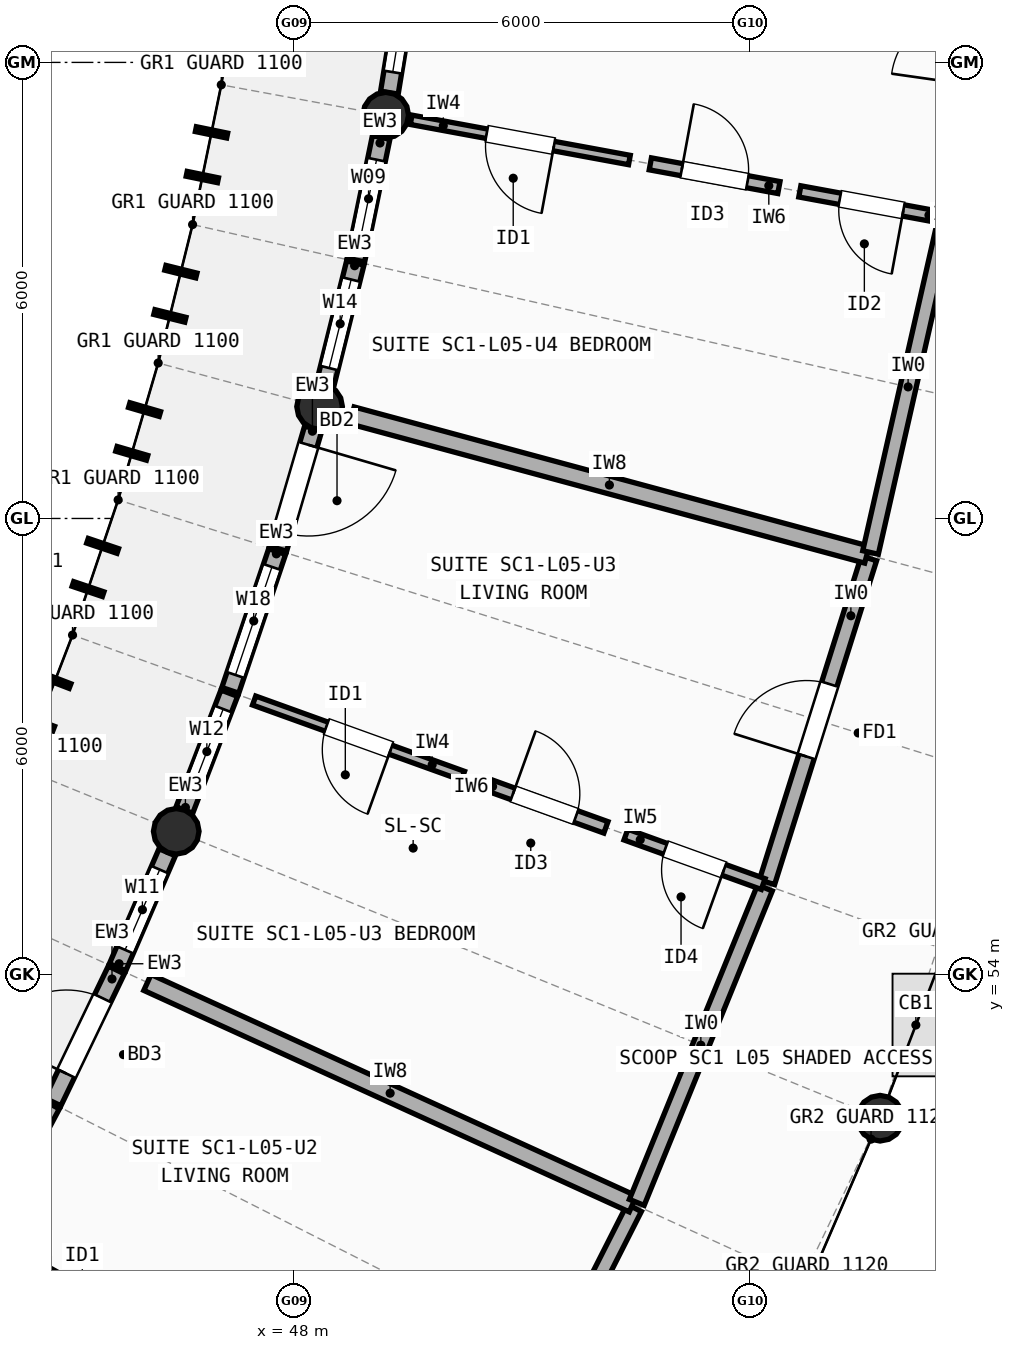
"""IFC4 building model, lengths in metres.
Left out: names, types, materials, properties, quantities, classifications, styles, units other than length and angle.
Written with IfcOpenShell. Run it as: python <this file> out.ifc"""

import sys

from ifc_helpers import new_model, si_unit, direction, frame, frame_2d, origin, origin_2d, place, context, subcontext, project, spatial, rectangle, circle, extrude, element, fill, save


model = new_model("IFC4")
c1 = context("Model", 3, precision=1e-05, world=origin(), true_north=direction((0.0, 1.0)))
c2 = subcontext(c1, "Body", "Model", "MODEL_VIEW")
j1 = project(units=[si_unit("LENGTHUNIT", "METRE"), si_unit("PLANEANGLEUNIT", "RADIAN")], contexts=[c1])
p1 = place(None, origin())
s1 = spatial("IfcSite", under=j1, at=p1, CompositionType="ELEMENT")
p2 = place(p1, origin())
s2 = spatial("IfcBuilding", under=s1, at=p2, CompositionType="ELEMENT")
p3 = place(p2, frame((0.0, 0.0, 17.3)))
s3 = spatial("IfcBuildingStorey", under=s2, at=p3, CompositionType="ELEMENT", Elevation=17.3)
for number, where, z_axis, x_axis in (
    (1, (46.45, 55.884, 0.0), (0.0, 0.0, 1.0), (1.0, 0.0, 0.0)),
    (2, (55.71, 52.11, 0.0), (0.0, 0.0, 1.0), (1.0, 0.0, 0.0)),
    (3, (48.336, 61.471, 0.0), (0.0, 0.0, 1.0), (1.0, 0.0, 0.0)),
    (4, (49.206, 65.306, 0.0), (0.0, 0.0, 1.0), (1.0, 0.0, 0.0)),
):
    element("IfcColumn", number, at=place(p3, frame(where, z_axis=z_axis, x_axis=x_axis)), inside=s3, PredefinedType="COLUMN", context=c2, shape_type="SweptSolid", body=[
        extrude(circle(Radius=0.3, at=origin_2d()), origin(), (0.0, 0.0, 1.0), 2.94),
    ])
p4 = place(p3, frame((44.034, 50.835, 0.0), z_axis=(0.0, 0.0, 1.0), x_axis=(0.470134157171, 0.882594966143, 0.0)))
e5 = element("IfcWall", 5, at=p4, inside=s3, PredefinedType="STANDARD", context=c2, shape_type="SweptSolid", body=[
    extrude(rectangle(XDim=1.647, YDim=0.235, at=frame_2d((0.823, 0.0))), origin(), (0.0, 0.0, 1.0), 2.676),
])
p5 = place(p4, frame((0.273, 0.0, 0.85)))
e6 = element("IfcOpeningElement", 6, at=p5, cuts=e5, PredefinedType="OPENING", context=c2, shape_type="SweptSolid", body=[
    extrude(rectangle(XDim=1.1, YDim=1.45, at=frame_2d((0.55, 0.725))), frame((0.0, 0.127, 0.0), z_axis=(0.0, -1.0, 0.0), x_axis=(1.0, 0.0, 0.0)), (0.0, 0.0, 1.0), 0.255),
])
p6 = place(p3, frame((44.826, 52.324, 0.0), z_axis=(0.0, 0.0, 1.0), x_axis=(0.433579410465, 0.90111536155, 0.0)))
e7 = element("IfcWall", 7, at=p6, inside=s3, PredefinedType="STANDARD", context=c2, shape_type="SweptSolid", body=[
    extrude(rectangle(XDim=1.927, YDim=0.235, at=frame_2d((0.963, 0.0))), origin(), (0.0, 0.0, 1.0), 2.676),
])
p7 = place(p6, frame((0.413, 0.0, 0.0)))
e8 = element("IfcOpeningElement", 8, at=p7, cuts=e7, PredefinedType="OPENING", context=c2, shape_type="SweptSolid", body=[
    extrude(rectangle(XDim=1.1, YDim=2.15, at=frame_2d((0.55, 1.075))), frame((0.0, 0.127, 0.0), z_axis=(0.0, -1.0, 0.0), x_axis=(1.0, 0.0, 0.0)), (0.0, 0.0, 1.0), 0.255),
])
p8 = place(p3, frame((45.678, 54.097, 0.0), z_axis=(0.0, 0.0, 1.0), x_axis=(0.396333765494, 0.918106500538, 0.0)))
e9 = element("IfcWall", 9, at=p8, inside=s3, PredefinedType="STANDARD", context=c2, shape_type="SweptSolid", body=[
    extrude(rectangle(XDim=1.646, YDim=0.235, at=frame_2d((0.823, 0.0))), origin(), (0.0, 0.0, 1.0), 2.676),
])
p9 = place(p8, frame((0.248, 0.0, 0.85)))
e10 = element("IfcOpeningElement", 10, at=p9, cuts=e9, PredefinedType="OPENING", context=c2, shape_type="SweptSolid", body=[
    extrude(rectangle(XDim=1.15, YDim=1.45, at=frame_2d((0.575, 0.725))), frame((0.0, 0.127, 0.0), z_axis=(0.0, -1.0, 0.0), x_axis=(1.0, 0.0, 0.0)), (0.0, 0.0, 1.0), 0.255),
])
p10 = place(p3, frame((46.558, 56.164, 0.0), z_axis=(0.0, 0.0, 1.0), x_axis=(0.358343161541, 0.933589941343, 0.0)))
e11 = element("IfcWall", 11, at=p10, inside=s3, PredefinedType="STANDARD", context=c2, shape_type="SweptSolid", body=[
    extrude(rectangle(XDim=1.647, YDim=0.235, at=frame_2d((0.823, 0.0))), origin(), (0.0, 0.0, 1.0), 2.676),
])
p11 = place(p10, frame((0.223, 0.0, 0.85)))
e12 = element("IfcOpeningElement", 12, at=p11, cuts=e11, PredefinedType="OPENING", context=c2, shape_type="SweptSolid", body=[
    extrude(rectangle(XDim=1.2, YDim=1.35, at=frame_2d((0.6, 0.675))), frame((0.0, 0.127, 0.0), z_axis=(0.0, -1.0, 0.0), x_axis=(1.0, 0.0, 0.0)), (0.0, 0.0, 1.0), 0.255),
])
p12 = place(p3, frame((47.161, 57.739, 0.0), z_axis=(0.0, 0.0, 1.0), x_axis=(0.319798549746, 0.947485560618, 0.0)))
e13 = element("IfcWall", 13, at=p12, inside=s3, PredefinedType="STANDARD", context=c2, shape_type="SweptSolid", body=[
    extrude(rectangle(XDim=1.927, YDim=0.235, at=frame_2d((0.963, 0.0))), origin(), (0.0, 0.0, 1.0), 2.676),
])
p13 = place(p12, frame((0.213, 0.0, 0.85)))
e14 = element("IfcOpeningElement", 14, at=p13, cuts=e13, PredefinedType="OPENING", context=c2, shape_type="SweptSolid", body=[
    extrude(rectangle(XDim=1.5, YDim=1.4, at=frame_2d((0.75, 0.7))), frame((0.0, 0.127, 0.0), z_axis=(0.0, -1.0, 0.0), x_axis=(1.0, 0.0, 0.0)), (0.0, 0.0, 1.0), 0.255),
])
p14 = place(p3, frame((47.79, 59.603, 0.0), z_axis=(0.0, 0.0, 1.0), x_axis=(0.280648942253, 0.959810487134, 0.0)))
e15 = element("IfcWall", 15, at=p14, inside=s3, PredefinedType="STANDARD", context=c2, shape_type="SweptSolid", body=[
    extrude(rectangle(XDim=1.647, YDim=0.235, at=frame_2d((0.823, 0.0))), origin(), (0.0, 0.0, 1.0), 2.676),
])
p15 = place(p14, frame((0.223, 0.0, 0.0)))
e16 = element("IfcOpeningElement", 16, at=p15, cuts=e15, PredefinedType="OPENING", context=c2, shape_type="SweptSolid", body=[
    extrude(rectangle(XDim=1.2, YDim=2.15, at=frame_2d((0.6, 1.075))), frame((0.0, 0.127, 0.0), z_axis=(0.0, -1.0, 0.0), x_axis=(1.0, 0.0, 0.0)), (0.0, 0.0, 1.0), 0.255),
])
p16 = place(p3, frame((48.408, 61.762, 0.0), z_axis=(0.0, 0.0, 1.0), x_axis=(0.241175130643, 0.970481610521, 0.0)))
e17 = element("IfcWall", 17, at=p16, inside=s3, PredefinedType="STANDARD", context=c2, shape_type="SweptSolid", body=[
    extrude(rectangle(XDim=1.647, YDim=0.235, at=frame_2d((0.823, 0.0))), origin(), (0.0, 0.0, 1.0), 2.676),
])
p17 = place(p16, frame((0.223, 0.0, 0.85)))
e18 = element("IfcOpeningElement", 18, at=p17, cuts=e17, PredefinedType="OPENING", context=c2, shape_type="SweptSolid", body=[
    extrude(rectangle(XDim=1.2, YDim=1.5, at=frame_2d((0.6, 0.75))), frame((0.0, 0.127, 0.0), z_axis=(0.0, -1.0, 0.0), x_axis=(1.0, 0.0, 0.0)), (0.0, 0.0, 1.0), 0.255),
])
p18 = place(p3, frame((48.814, 63.399, 0.0), z_axis=(0.0, 0.0, 1.0), x_axis=(0.201188555682, 0.97955253308, 0.0)))
e19 = element("IfcWall", 19, at=p18, inside=s3, PredefinedType="STANDARD", context=c2, shape_type="SweptSolid", body=[
    extrude(rectangle(XDim=1.647, YDim=0.235, at=frame_2d((0.823, 0.0))), origin(), (0.0, 0.0, 1.0), 2.676),
])
p19 = place(p18, frame((0.298, 0.0, 0.85)))
e20 = element("IfcOpeningElement", 20, at=p19, cuts=e19, PredefinedType="OPENING", context=c2, shape_type="SweptSolid", body=[
    extrude(rectangle(XDim=1.05, YDim=1.35, at=frame_2d((0.525, 0.675))), frame((0.0, 0.127, 0.0), z_axis=(0.0, -1.0, 0.0), x_axis=(1.0, 0.0, 0.0)), (0.0, 0.0, 1.0), 0.255),
])
p20 = place(p3, frame((49.254, 65.603, 0.0), z_axis=(0.0, 0.0, 1.0), x_axis=(0.161008118798, 0.986953081803, 0.0)))
e21 = element("IfcWall", 21, at=p20, inside=s3, PredefinedType="STANDARD", context=c2, shape_type="SweptSolid", body=[
    extrude(rectangle(XDim=1.647, YDim=0.235, at=frame_2d((0.823, 0.0))), origin(), (0.0, 0.0, 1.0), 2.676),
])
p21 = place(p20, frame((0.273, 0.0, 0.85)))
e22 = element("IfcOpeningElement", 22, at=p21, cuts=e21, PredefinedType="OPENING", context=c2, shape_type="SweptSolid", body=[
    extrude(rectangle(XDim=1.1, YDim=1.45, at=frame_2d((0.55, 0.725))), frame((0.0, 0.127, 0.0), z_axis=(0.0, -1.0, 0.0), x_axis=(1.0, 0.0, 0.0)), (0.0, 0.0, 1.0), 0.255),
])
p22 = place(p3, frame((50.457, 46.945, 0.0), z_axis=(0.0, 0.0, 1.0), x_axis=(0.451972910967, 0.892031662976, 0.0)))
e23 = element("IfcWall", 23, at=p22, inside=s3, PredefinedType="SOLIDWALL", context=c2, shape_type="SweptSolid", body=[
    extrude(rectangle(XDim=4.467, YDim=0.21, at=frame_2d((2.234, 0.0))), origin(), (0.0, 0.0, 1.0), 2.754),
])
p23 = place(p22, frame((1.708, 0.0, 0.0)))
e24 = element("IfcOpeningElement", 24, at=p23, cuts=e23, PredefinedType="OPENING", context=c2, shape_type="SweptSolid", body=[
    extrude(rectangle(XDim=1.05, YDim=2.15, at=frame_2d((0.525, 1.075))), frame((0.0, 0.115, 0.0), z_axis=(0.0, -1.0, 0.0), x_axis=(1.0, 0.0, 0.0)), (0.0, 0.0, 1.0), 0.23),
])
p24 = place(p3, frame((44.19, 50.404, 0.0), z_axis=(0.0, 0.0, 1.0), x_axis=(0.872785313841, -0.488104287978, 0.0)))
e25 = element("IfcWall", 25, at=p24, inside=s3, PredefinedType="PARTITIONING", context=c2, shape_type="SweptSolid", body=[
    extrude(rectangle(XDim=2.92, YDim=0.125, at=frame_2d((1.46, 0.0))), origin(), (0.0, 0.0, 1.0), 2.734),
])
p25 = place(p24, frame((1.01, 0.0, 0.0)))
e26 = element("IfcOpeningElement", 26, at=p25, cuts=e25, PredefinedType="OPENING", context=c2, shape_type="SweptSolid", body=[
    extrude(rectangle(XDim=0.9, YDim=2.1, at=frame_2d((0.45, 1.05))), frame((0.0, 0.073, 0.0), z_axis=(0.0, -1.0, 0.0), x_axis=(1.0, 0.0, 0.0)), (0.0, 0.0, 1.0), 0.145),
])
p26 = place(p3, frame((46.071, 53.896, 0.0), z_axis=(0.0, 0.0, 1.0), x_axis=(0.909807068599, -0.415031442095, 0.0)))
e27 = element("IfcWall", 27, at=p26, inside=s3, PredefinedType="SOLIDWALL", context=c2, shape_type="SweptSolid", body=[
    extrude(rectangle(XDim=7.02, YDim=0.23, at=frame_2d((3.51, 0.0))), origin(), (0.0, 0.0, 1.0), 2.714),
])
p27 = place(p3, frame((52.509, 51.002, 0.0), z_axis=(0.0, 0.0, 1.0), x_axis=(0.377413192487, 0.926044967665, 0.0)))
e28 = element("IfcWall", 28, at=p27, inside=s3, PredefinedType="SOLIDWALL", context=c2, shape_type="SweptSolid", body=[
    extrude(rectangle(XDim=4.467, YDim=0.21, at=frame_2d((2.234, 0.0))), origin(), (0.0, 0.0, 1.0), 2.734),
])
p28 = place(p3, frame((54.222, 55.215, 0.0), z_axis=(0.0, 0.0, 1.0), x_axis=(0.300377958446, 0.953820256694, 0.0)))
e29 = element("IfcWall", 29, at=p28, inside=s3, PredefinedType="SOLIDWALL", context=c2, shape_type="SweptSolid", body=[
    extrude(rectangle(XDim=4.467, YDim=0.21, at=frame_2d((2.233, 0.0))), origin(), (0.0, 0.0, 1.0), 2.714),
])
p29 = place(p28, frame((1.733, 0.0, 0.0)))
e30 = element("IfcOpeningElement", 30, at=p29, cuts=e29, PredefinedType="OPENING", context=c2, shape_type="SweptSolid", body=[
    extrude(rectangle(XDim=1.0, YDim=2.15, at=frame_2d((0.5, 1.075))), frame((0.0, 0.115, 0.0), z_axis=(0.0, -1.0, 0.0), x_axis=(1.0, 0.0, 0.0)), (0.0, 0.0, 1.0), 0.23),
])
p30 = place(p3, frame((47.475, 57.605, 0.0), z_axis=(0.0, 0.0, 1.0), x_axis=(0.940746643475, -0.33911023693, 0.0)))
e31 = element("IfcWall", 31, at=p30, inside=s3, PredefinedType="PARTITIONING", context=c2, shape_type="SweptSolid", body=[
    extrude(rectangle(XDim=2.92, YDim=0.125, at=frame_2d((1.46, 0.0))), origin(), (0.0, 0.0, 1.0), 2.754),
])
p31 = place(p30, frame((1.01, 0.0, 0.0)))
e32 = element("IfcOpeningElement", 32, at=p31, cuts=e31, PredefinedType="OPENING", context=c2, shape_type="SweptSolid", body=[
    extrude(rectangle(XDim=0.9, YDim=2.1, at=frame_2d((0.45, 1.05))), frame((0.0, 0.073, 0.0), z_axis=(0.0, -1.0, 0.0), x_axis=(1.0, 0.0, 0.0)), (0.0, 0.0, 1.0), 0.145),
])
p32 = place(p3, frame((50.485, 56.519, 0.0), z_axis=(0.0, 0.0, 1.0), x_axis=(0.940738931862, -0.339131629428, 0.0)))
e33 = element("IfcWall", 33, at=p32, inside=s3, PredefinedType="PLUMBINGWALL", context=c2, shape_type="SweptSolid", body=[
    extrude(rectangle(XDim=1.72, YDim=0.16, at=frame_2d((0.86, 0.0))), origin(), (0.0, 0.0, 1.0), 2.754),
])
p33 = place(p32, frame((0.42, 0.0, 0.0)))
e34 = element("IfcOpeningElement", 34, at=p33, cuts=e33, PredefinedType="OPENING", context=c2, shape_type="SweptSolid", body=[
    extrude(rectangle(XDim=0.88, YDim=2.1, at=frame_2d((0.44, 1.05))), frame((0.0, 0.09, 0.0), z_axis=(0.0, -1.0, 0.0), x_axis=(1.0, 0.0, 0.0)), (0.0, 0.0, 1.0), 0.18),
])
p34 = place(p3, frame((52.366, 55.841, 0.0), z_axis=(0.0, 0.0, 1.0), x_axis=(0.94073656273, -0.339138201244, 0.0)))
e35 = element("IfcWall", 35, at=p34, inside=s3, PredefinedType="PARTITIONING", context=c2, shape_type="SweptSolid", body=[
    extrude(rectangle(XDim=1.92, YDim=0.15, at=frame_2d((0.96, 0.0))), origin(), (0.0, 0.0, 1.0), 2.754),
])
p35 = place(p34, frame((0.55, 0.0, 0.0)))
e36 = element("IfcOpeningElement", 36, at=p35, cuts=e35, PredefinedType="OPENING", context=c2, shape_type="SweptSolid", body=[
    extrude(rectangle(XDim=0.82, YDim=2.08, at=frame_2d((0.41, 1.04))), frame((0.0, 0.085, 0.0), z_axis=(0.0, -1.0, 0.0), x_axis=(1.0, 0.0, 0.0)), (0.0, 0.0, 1.0), 0.17),
])
p36 = place(p3, frame((48.761, 61.356, 0.0), z_axis=(0.0, 0.0, 1.0), x_axis=(0.965329768393, -0.26103340448, 0.0)))
e37 = element("IfcWall", 37, at=p36, inside=s3, PredefinedType="SOLIDWALL", context=c2, shape_type="SweptSolid", body=[
    extrude(rectangle(XDim=7.02, YDim=0.23, at=frame_2d((3.51, 0.0))), origin(), (0.0, 0.0, 1.0), 2.734),
])
p37 = place(p3, frame((55.585, 59.552, 0.0), z_axis=(0.0, 0.0, 1.0), x_axis=(0.221221895428, 0.97522349899, 0.0)))
e38 = element("IfcWall", 38, at=p37, inside=s3, PredefinedType="SOLIDWALL", context=c2, shape_type="SweptSolid", body=[
    extrude(rectangle(XDim=4.467, YDim=0.21, at=frame_2d((2.234, 0.0))), origin(), (0.0, 0.0, 1.0), 2.754),
])
p38 = place(p3, frame((49.541, 65.245, 0.0), z_axis=(0.0, 0.0, 1.0), x_axis=(0.983451228591, -0.181173069145, 0.0)))
e39 = element("IfcWall", 39, at=p38, inside=s3, PredefinedType="PARTITIONING", context=c2, shape_type="SweptSolid", body=[
    extrude(rectangle(XDim=2.92, YDim=0.125, at=frame_2d((1.46, 0.0))), origin(), (0.0, 0.0, 1.0), 2.714),
])
p39 = place(p38, frame((1.01, 0.0, 0.0)))
e40 = element("IfcOpeningElement", 40, at=p39, cuts=e39, PredefinedType="OPENING", context=c2, shape_type="SweptSolid", body=[
    extrude(rectangle(XDim=0.9, YDim=2.1, at=frame_2d((0.45, 1.05))), frame((0.0, 0.073, 0.0), z_axis=(0.0, -1.0, 0.0), x_axis=(1.0, 0.0, 0.0)), (0.0, 0.0, 1.0), 0.145),
])
p40 = place(p3, frame((52.688, 64.665, 0.0), z_axis=(0.0, 0.0, 1.0), x_axis=(0.983463169084, -0.181108241269, 0.0)))
e41 = element("IfcWall", 41, at=p40, inside=s3, PredefinedType="PLUMBINGWALL", context=c2, shape_type="SweptSolid", body=[
    extrude(rectangle(XDim=1.72, YDim=0.16, at=frame_2d((0.86, 0.0))), origin(), (0.0, 0.0, 1.0), 2.714),
])
p41 = place(p40, frame((0.42, 0.0, 0.0)))
e42 = element("IfcOpeningElement", 42, at=p41, cuts=e41, PredefinedType="OPENING", context=c2, shape_type="SweptSolid", body=[
    extrude(rectangle(XDim=0.88, YDim=2.1, at=frame_2d((0.44, 1.05))), frame((0.0, 0.09, 0.0), z_axis=(0.0, -1.0, 0.0), x_axis=(1.0, 0.0, 0.0)), (0.0, 0.0, 1.0), 0.18),
])
p42 = place(p3, frame((54.655, 64.303, 0.0), z_axis=(0.0, 0.0, 1.0), x_axis=(0.983468686283, -0.181078278933, 0.0)))
e43 = element("IfcWall", 43, at=p42, inside=s3, PredefinedType="PARTITIONING", context=c2, shape_type="SweptSolid", body=[
    extrude(rectangle(XDim=1.92, YDim=0.15, at=frame_2d((0.96, 0.0))), origin(), (0.0, 0.0, 1.0), 2.714),
])
p43 = place(p42, frame((0.535, 0.0, 0.0)))
e44 = element("IfcOpeningElement", 44, at=p43, cuts=e43, PredefinedType="OPENING", context=c2, shape_type="SweptSolid", body=[
    extrude(rectangle(XDim=0.85, YDim=2.1, at=frame_2d((0.425, 1.05))), frame((0.0, 0.085, 0.0), z_axis=(0.0, -1.0, 0.0), x_axis=(1.0, 0.0, 0.0)), (0.0, 0.0, 1.0), 0.17),
])
p44 = place(p7, origin())
e45 = element("IfcDoor", 45, at=p44, inside=s3, OperationType="SINGLE_SWING_LEFT", PredefinedType="DOOR", context=c2, shape_type="SweptSolid", body=[
    extrude(rectangle(XDim=1.1, YDim=2.15, at=frame_2d((0.55, 1.075))), frame((0.0, 0.025, 0.0), z_axis=(0.0, -1.0, 0.0), x_axis=(1.0, 0.0, 0.0)), (0.0, 0.0, 1.0), 0.05),
])
fill(e8, e45)
p45 = place(p9, origin())
e46 = element("IfcWindow", 46, at=p45, inside=s3, PartitioningType="SINGLE_PANEL", PredefinedType="WINDOW", context=c2, shape_type="SweptSolid", body=[
    extrude(rectangle(XDim=1.15, YDim=1.45, at=frame_2d((0.575, 0.725))), frame((0.0, 0.03, 0.0), z_axis=(0.0, -1.0, 0.0), x_axis=(1.0, 0.0, 0.0)), (0.0, 0.0, 1.0), 0.06),
])
fill(e10, e46)
p46 = place(p11, origin())
e47 = element("IfcWindow", 47, at=p46, inside=s3, PartitioningType="SINGLE_PANEL", PredefinedType="WINDOW", context=c2, shape_type="SweptSolid", body=[
    extrude(rectangle(XDim=1.2, YDim=1.35, at=frame_2d((0.6, 0.675))), frame((0.0, 0.03, 0.0), z_axis=(0.0, -1.0, 0.0), x_axis=(1.0, 0.0, 0.0)), (0.0, 0.0, 1.0), 0.06),
])
fill(e12, e47)
p47 = place(p13, origin())
e48 = element("IfcWindow", 48, at=p47, inside=s3, PartitioningType="SINGLE_PANEL", PredefinedType="WINDOW", context=c2, shape_type="SweptSolid", body=[
    extrude(rectangle(XDim=1.5, YDim=1.4, at=frame_2d((0.75, 0.7))), frame((0.0, 0.03, 0.0), z_axis=(0.0, -1.0, 0.0), x_axis=(1.0, 0.0, 0.0)), (0.0, 0.0, 1.0), 0.06),
])
fill(e14, e48)
p48 = place(p15, origin())
e49 = element("IfcDoor", 49, at=p48, inside=s3, OperationType="SINGLE_SWING_RIGHT", PredefinedType="DOOR", context=c2, shape_type="SweptSolid", body=[
    extrude(rectangle(XDim=1.2, YDim=2.15, at=frame_2d((0.6, 1.075))), frame((0.0, 0.025, 0.0), z_axis=(0.0, -1.0, 0.0), x_axis=(1.0, 0.0, 0.0)), (0.0, 0.0, 1.0), 0.05),
])
fill(e16, e49)
p49 = place(p17, origin())
e50 = element("IfcWindow", 50, at=p49, inside=s3, PartitioningType="SINGLE_PANEL", PredefinedType="WINDOW", context=c2, shape_type="SweptSolid", body=[
    extrude(rectangle(XDim=1.2, YDim=1.5, at=frame_2d((0.6, 0.75))), frame((0.0, 0.03, 0.0), z_axis=(0.0, -1.0, 0.0), x_axis=(1.0, 0.0, 0.0)), (0.0, 0.0, 1.0), 0.06),
])
fill(e18, e50)
p50 = place(p19, origin())
e51 = element("IfcWindow", 51, at=p50, inside=s3, PartitioningType="SINGLE_PANEL", PredefinedType="WINDOW", context=c2, shape_type="SweptSolid", body=[
    extrude(rectangle(XDim=1.05, YDim=1.35, at=frame_2d((0.525, 0.675))), frame((0.0, 0.03, 0.0), z_axis=(0.0, -1.0, 0.0), x_axis=(1.0, 0.0, 0.0)), (0.0, 0.0, 1.0), 0.06),
])
fill(e20, e51)
p51 = place(p21, origin())
e52 = element("IfcWindow", 52, at=p51, inside=s3, PartitioningType="SINGLE_PANEL", PredefinedType="WINDOW", context=c2, shape_type="SweptSolid", body=[
    extrude(rectangle(XDim=1.1, YDim=1.45, at=frame_2d((0.55, 0.725))), frame((0.0, 0.03, 0.0), z_axis=(0.0, -1.0, 0.0), x_axis=(1.0, 0.0, 0.0)), (0.0, 0.0, 1.0), 0.06),
])
fill(e22, e52)
p52 = place(p29, origin())
e53 = element("IfcDoor", 53, at=p52, inside=s3, OperationType="SINGLE_SWING_LEFT", PredefinedType="DOOR", context=c2, shape_type="SweptSolid", body=[
    extrude(rectangle(XDim=1.0, YDim=2.15, at=frame_2d((0.5, 1.075))), frame((0.0, 0.025, 0.0), z_axis=(0.0, -1.0, 0.0), x_axis=(1.0, 0.0, 0.0)), (0.0, 0.0, 1.0), 0.05),
])
fill(e30, e53)
p53 = place(p31, origin())
e54 = element("IfcDoor", 54, at=p53, inside=s3, OperationType="SINGLE_SWING_RIGHT", PredefinedType="DOOR", context=c2, shape_type="SweptSolid", body=[
    extrude(rectangle(XDim=0.9, YDim=2.1, at=frame_2d((0.45, 1.05))), frame((0.0, 0.025, 0.0), z_axis=(0.0, -1.0, 0.0), x_axis=(1.0, 0.0, 0.0)), (0.0, 0.0, 1.0), 0.05),
])
fill(e32, e54)
p54 = place(p33, origin())
e55 = element("IfcDoor", 55, at=p54, inside=s3, OperationType="SINGLE_SWING_LEFT", PredefinedType="DOOR", context=c2, shape_type="SweptSolid", body=[
    extrude(rectangle(XDim=0.88, YDim=2.1, at=frame_2d((0.44, 1.05))), frame((0.0, 0.025, 0.0), z_axis=(0.0, -1.0, 0.0), x_axis=(1.0, 0.0, 0.0)), (0.0, 0.0, 1.0), 0.05),
])
fill(e34, e55)
p55 = place(p35, origin())
e56 = element("IfcDoor", 56, at=p55, inside=s3, OperationType="SINGLE_SWING_RIGHT", PredefinedType="DOOR", context=c2, shape_type="SweptSolid", body=[
    extrude(rectangle(XDim=0.82, YDim=2.08, at=frame_2d((0.41, 1.04))), frame((0.0, 0.025, 0.0), z_axis=(0.0, -1.0, 0.0), x_axis=(1.0, 0.0, 0.0)), (0.0, 0.0, 1.0), 0.05),
])
fill(e36, e56)
p56 = place(p39, origin())
e57 = element("IfcDoor", 57, at=p56, inside=s3, OperationType="SINGLE_SWING_RIGHT", PredefinedType="DOOR", context=c2, shape_type="SweptSolid", body=[
    extrude(rectangle(XDim=0.9, YDim=2.1, at=frame_2d((0.45, 1.05))), frame((0.0, 0.025, 0.0), z_axis=(0.0, -1.0, 0.0), x_axis=(1.0, 0.0, 0.0)), (0.0, 0.0, 1.0), 0.05),
])
fill(e40, e57)
p57 = place(p41, origin())
e58 = element("IfcDoor", 58, at=p57, inside=s3, OperationType="SINGLE_SWING_LEFT", PredefinedType="DOOR", context=c2, shape_type="SweptSolid", body=[
    extrude(rectangle(XDim=0.88, YDim=2.1, at=frame_2d((0.44, 1.05))), frame((0.0, 0.025, 0.0), z_axis=(0.0, -1.0, 0.0), x_axis=(1.0, 0.0, 0.0)), (0.0, 0.0, 1.0), 0.05),
])
fill(e42, e58)
p58 = place(p43, origin())
e59 = element("IfcDoor", 59, at=p58, inside=s3, OperationType="SINGLE_SWING_RIGHT", PredefinedType="DOOR", context=c2, shape_type="SweptSolid", body=[
    extrude(rectangle(XDim=0.85, YDim=2.1, at=frame_2d((0.425, 1.05))), frame((0.0, 0.025, 0.0), z_axis=(0.0, -1.0, 0.0), x_axis=(1.0, 0.0, 0.0)), (0.0, 0.0, 1.0), 0.05),
])
fill(e44, e59)
save(model, sys.argv[1])
